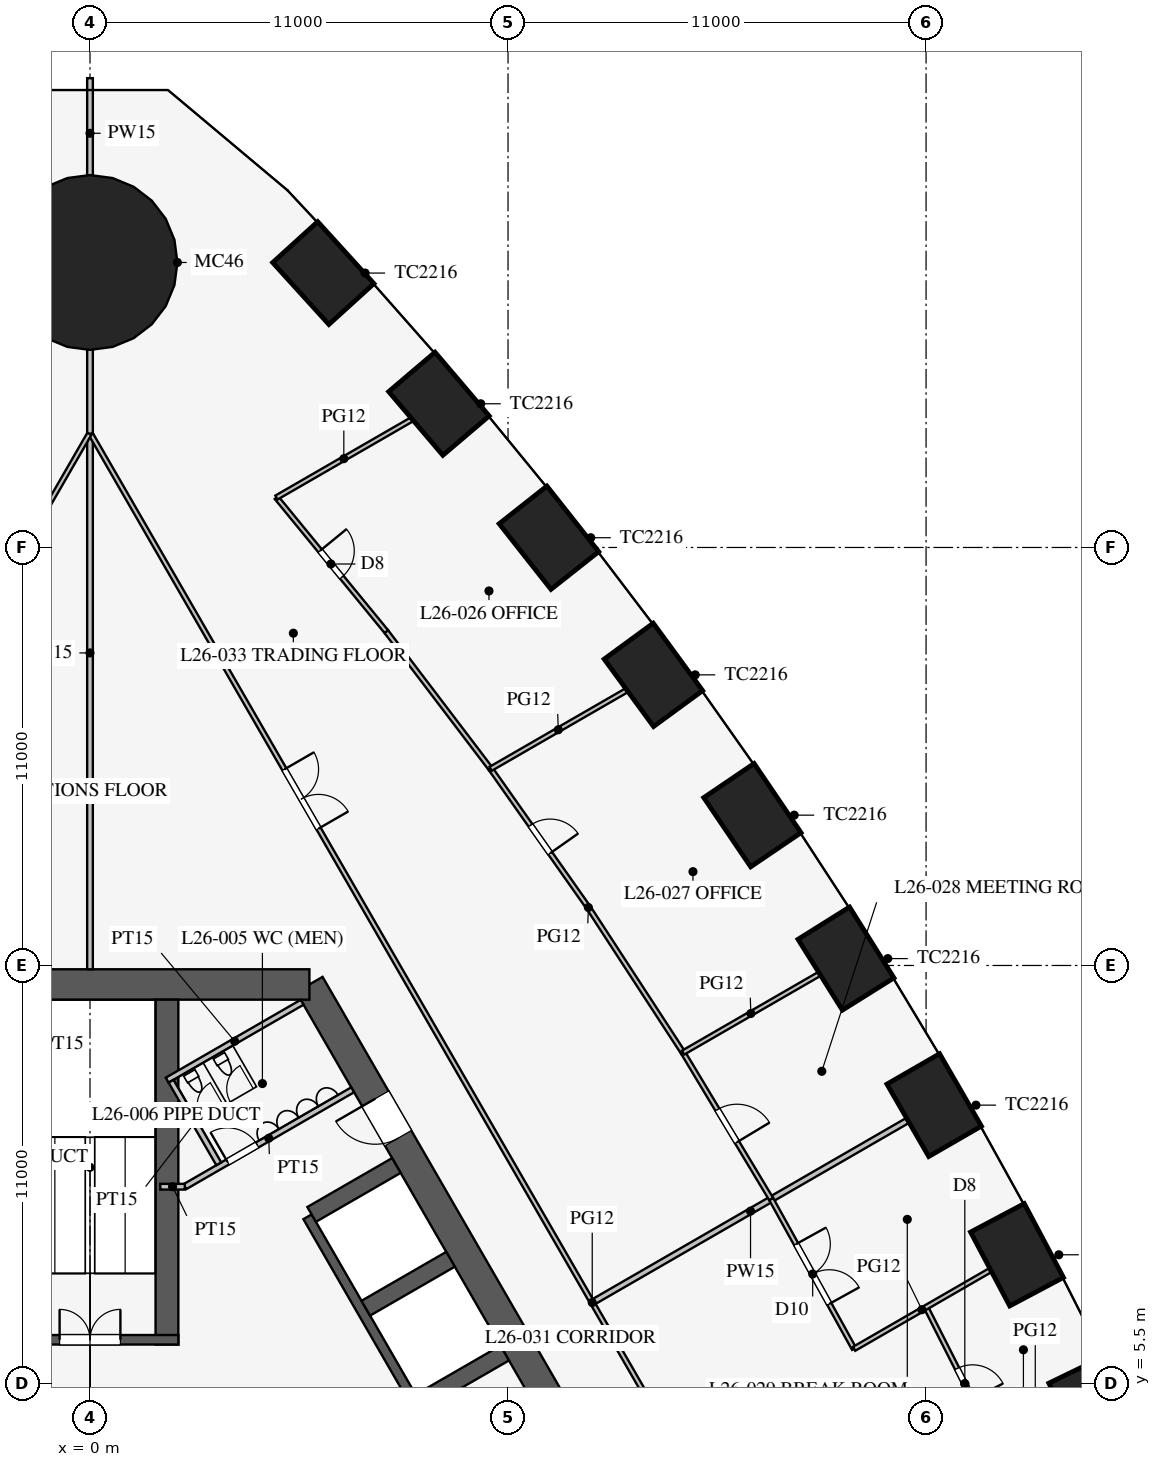
"""IFC4 building model, lengths in metres.
Left out: names, types, materials, properties, quantities, classifications, styles, units other than length and angle.
Written with IfcOpenShell. Run it as: python <this file> out.ifc"""

import sys

from ifc_helpers import new_model, si_unit, direction, frame, frame_2d, origin, origin_2d, place, context, subcontext, project, spatial, rectangle, circle, extrude, element, fill, save


model = new_model("IFC4")
c1 = context("Model", 3, precision=1e-05, world=origin(), true_north=direction((0.0, 1.0)))
c2 = subcontext(c1, "Body", "Model", "MODEL_VIEW")
j1 = project(units=[si_unit("LENGTHUNIT", "METRE"), si_unit("PLANEANGLEUNIT", "RADIAN")], contexts=[c1])
p1 = place(None, origin())
s1 = spatial("IfcSite", under=j1, at=p1, CompositionType="ELEMENT")
p2 = place(p1, origin())
s2 = spatial("IfcBuilding", under=s1, at=p2, CompositionType="ELEMENT")
p3 = place(p2, frame((0.0, 0.0, 115.7)))
s3 = spatial("IfcBuildingStorey", under=s2, at=p3, CompositionType="ELEMENT", Elevation=115.7)
for number, where, z_axis, x_axis in (
    (1, (26.43, 4.867, 0.0), (0.0, 0.0, 1.0), (-0.436, 0.9, 0.0)),
    (2, (24.393, 8.887, 0.0), (0.0, 0.0, 1.0), (-0.468, 0.883, 0.0)),
    (3, (22.213, 12.825, 0.0), (0.0, 0.0, 1.0), (-0.5, 0.866, 0.0)),
    (4, (19.893, 16.681, 0.0), (0.0, 0.0, 1.0), (-0.531, 0.847, 0.0)),
    (5, (17.43, 20.456, 0.0), (0.0, 0.0, 1.0), (-0.561, 0.828, 0.0)),
    (6, (14.825, 24.148, 0.0), (0.0, 0.0, 1.0), (-0.591, 0.807, 0.0)),
    (7, (12.077, 27.757, 0.0), (0.0, 0.0, 1.0), (-0.62, 0.785, 0.0)),
    (8, (9.182, 31.282, 0.0), (0.0, 0.0, 1.0), (-0.648, 0.762, 0.0)),
    (9, (6.139, 34.721, 0.0), (0.0, 0.0, 1.0), (-0.672, 0.74, 0.0)),
):
    element("IfcColumn", number, at=place(p3, frame(where, z_axis=z_axis, x_axis=x_axis)), inside=s3, PredefinedType="COLUMN", context=c2, shape_type="SweptSolid", body=[
        extrude(rectangle(XDim=2.2, YDim=1.6, at=origin_2d()), origin(), (0.0, 0.0, 1.0), 4.2),
    ])
p4 = place(p3, frame((0.0, 35.0, 0.0), z_axis=(0.0, 0.0, 1.0), x_axis=(1.0, 0.0, 0.0)))
e10 = element("IfcColumn", 10, at=p4, inside=s3, PredefinedType="COLUMN", context=c2, shape_type="SweptSolid", body=[
    extrude(circle(Radius=2.3, at=origin_2d()), origin(), (0.0, 0.0, 1.0), 4.2),
])
p5 = place(p3, frame((16.743, -3.0, 0.0), z_axis=(0.0, 0.0, 1.0), x_axis=(-0.500002442456, 0.866023993627, 0.0)))
e11 = element("IfcWall", 11, at=p5, inside=s3, PredefinedType="SHEAR", context=c2, shape_type="SweptSolid", body=[
    extrude(rectangle(XDim=21.939, YDim=0.8, at=frame_2d((10.97, 0.0))), origin(), (0.0, 0.0, 1.0), 4.2),
])
p6 = place(p5, frame((17.27, 0.0, 0.0)))
e12 = element("IfcOpeningElement", 12, at=p6, cuts=e11, PredefinedType="OPENING", context=c2, shape_type="SweptSolid", body=[
    extrude(rectangle(XDim=1.2, YDim=2.1, at=frame_2d((0.6, 1.05))), frame((0.0, 0.41, 0.0), z_axis=(0.0, -1.0, 0.0), x_axis=(1.0, 0.0, 0.0)), (0.0, 0.0, 1.0), 0.82),
])
p7 = place(p5, frame((3.47, 0.0, 0.0)))
e13 = element("IfcOpeningElement", 13, at=p7, cuts=e11, PredefinedType="OPENING", context=c2, shape_type="SweptSolid", body=[
    extrude(rectangle(XDim=1.2, YDim=2.1, at=frame_2d((0.6, 1.05))), frame((0.0, 0.41, 0.0), z_axis=(0.0, -1.0, 0.0), x_axis=(1.0, 0.0, 0.0)), (0.0, 0.0, 1.0), 0.82),
])
p8 = place(p3, frame((5.773, 16.0, 0.0), z_axis=(0.0, 0.0, 1.0), x_axis=(-1.0, 0.0, 0.0)))
e14 = element("IfcWall", 14, at=p8, inside=s3, PredefinedType="SHEAR", context=c2, shape_type="SweptSolid", body=[
    extrude(rectangle(XDim=11.547, YDim=0.8, at=frame_2d((5.773, 0.0))), origin(), (0.0, 0.0, 1.0), 4.2),
])
p9 = place(p3, frame((11.424, 0.014, 0.0), z_axis=(0.0, 0.0, 1.0), x_axis=(-0.500001763848, 0.866024385424, 0.0)))
e15 = element("IfcWall", 15, at=p9, inside=s3, PredefinedType="SHEAR", context=c2, shape_type="SweptSolid", body=[
    extrude(rectangle(XDim=11.4, YDim=0.25, at=frame_2d((5.7, 0.0))), origin(), (0.0, 0.0, 1.0), 4.2),
])
p10 = place(p9, frame((0.975, 0.0, 0.0)))
e16 = element("IfcOpeningElement", 16, at=p10, cuts=e15, PredefinedType="OPENING", context=c2, shape_type="SweptSolid", body=[
    extrude(rectangle(XDim=0.9, YDim=2.1, at=frame_2d((0.45, 1.05))), frame((0.0, 0.135, 0.0), z_axis=(0.0, -1.0, 0.0), x_axis=(1.0, 0.0, 0.0)), (0.0, 0.0, 1.0), 0.27),
])
p11 = place(p9, frame((3.825, 0.0, 0.0)))
e17 = element("IfcOpeningElement", 17, at=p11, cuts=e15, PredefinedType="OPENING", context=c2, shape_type="SweptSolid", body=[
    extrude(rectangle(XDim=0.9, YDim=2.1, at=frame_2d((0.45, 1.05))), frame((0.0, 0.135, 0.0), z_axis=(0.0, -1.0, 0.0), x_axis=(1.0, 0.0, 0.0)), (0.0, 0.0, 1.0), 0.27),
])
for number, where, z_axis, x_axis in (
    (18, (8.682, 5.012, 0.0), (0.0, 0.0, 1.0), (0.866, 0.5, 0.0)),
    (19, (7.257, 7.481, 0.0), (0.0, 0.0, 1.0), (0.866, 0.5, 0.0)),
):
    element("IfcWall", number, at=place(p3, frame(where, z_axis=z_axis, x_axis=x_axis)), inside=s3, PredefinedType="SHEAR", context=c2, shape_type="SweptSolid", body=[
        extrude(rectangle(XDim=2.575, YDim=0.45, at=frame_2d((1.288, 0.0))), origin(), (0.0, 0.0, 1.0), 4.2),
    ])
p12 = place(p3, frame((5.832, 9.949, 0.0), z_axis=(0.0, 0.0, 1.0), x_axis=(0.866029291668, 0.499993265928, 0.0)))
e20 = element("IfcWall", 20, at=p12, inside=s3, PredefinedType="SHEAR", context=c2, shape_type="SweptSolid", body=[
    extrude(rectangle(XDim=2.575, YDim=0.45, at=frame_2d((1.288, 0.0))), origin(), (0.0, 0.0, 1.0), 4.2),
])
p13 = place(p3, frame((2.025, 6.525, 0.0), z_axis=(0.0, 0.0, 1.0), x_axis=(0.0, 1.0, 0.0)))
e21 = element("IfcWall", 21, at=p13, inside=s3, PredefinedType="SHEAR", context=c2, shape_type="SweptSolid", body=[
    extrude(rectangle(XDim=9.075, YDim=0.6, at=frame_2d((4.538, 0.0))), origin(), (0.0, 0.0, 1.0), 4.2),
])
p14 = place(p3, frame((2.325, 6.65, 0.0), z_axis=(0.0, 0.0, 1.0), x_axis=(-1.0, 0.0, 0.0)))
e22 = element("IfcWall", 22, at=p14, inside=s3, PredefinedType="SHEAR", context=c2, shape_type="SweptSolid", body=[
    extrude(rectangle(XDim=4.65, YDim=0.25, at=frame_2d((2.325, 0.0))), origin(), (0.0, 0.0, 1.0), 4.2),
])
p15 = place(p14, frame((1.525, 0.0, 0.0)))
e23 = element("IfcOpeningElement", 23, at=p15, cuts=e22, PredefinedType="OPENING", context=c2, shape_type="SweptSolid", body=[
    extrude(rectangle(XDim=1.6, YDim=2.1, at=frame_2d((0.8, 1.05))), frame((0.0, 0.135, 0.0), z_axis=(0.0, -1.0, 0.0), x_axis=(1.0, 0.0, 0.0)), (0.0, 0.0, 1.0), 0.27),
])
p16 = place(p3, frame((2.495, 10.678, 0.0), z_axis=(0.0, 0.0, 1.0), x_axis=(0.86602216432, 0.500005610874, 0.0)))
e24 = element("IfcWall", 24, at=p16, inside=s3, PredefinedType="PARTITIONING", context=c2, shape_type="SweptSolid", body=[
    extrude(rectangle(XDim=5.1, YDim=0.15, at=frame_2d((2.55, 0.0))), origin(), (0.0, 0.0, 1.0), 4.0),
])
p17 = place(p16, frame((1.3, 0.0, 0.0)))
e25 = element("IfcOpeningElement", 25, at=p17, cuts=e24, PredefinedType="OPENING", context=c2, shape_type="SweptSolid", body=[
    extrude(rectangle(XDim=0.9, YDim=2.1, at=frame_2d((0.45, 1.05))), frame((0.0, 0.085, 0.0), z_axis=(0.0, -1.0, 0.0), x_axis=(1.0, 0.0, 0.0)), (0.0, 0.0, 1.0), 0.17),
])
p18 = place(p3, frame((2.495, 10.678, 0.0), z_axis=(0.0, 0.0, 1.0), x_axis=(-1.0, 0.0, 0.0)))
e26 = element("IfcWall", 26, at=p18, inside=s3, PredefinedType="PARTITIONING", context=c2, shape_type="SweptSolid", body=[
    extrude(rectangle(XDim=0.645, YDim=0.15, at=frame_2d((0.323, 0.0))), origin(), (0.0, 0.0, 1.0), 4.0),
])
p19 = place(p3, frame((2.031, 13.482, 0.0), z_axis=(0.0, 0.0, 1.0), x_axis=(0.866050731258, 0.499956128963, 0.0)))
e27 = element("IfcWall", 27, at=p19, inside=s3, PredefinedType="PARTITIONING", context=c2, shape_type="SweptSolid", body=[
    extrude(rectangle(XDim=4.1, YDim=0.15, at=frame_2d((2.05, 0.0))), origin(), (0.0, 0.0, 1.0), 4.0),
])
p20 = place(p3, frame((3.389, 11.281, 0.0), z_axis=(0.0, 0.0, 1.0), x_axis=(-0.499989096993, 0.866031698547, 0.0)))
e28 = element("IfcWall", 28, at=p20, inside=s3, PredefinedType="PARTITIONING", context=c2, shape_type="SweptSolid", body=[
    extrude(rectangle(XDim=2.51, YDim=0.15, at=frame_2d((1.255, 0.0))), origin(), (0.0, 0.0, 1.0), 4.0),
])
p21 = place(p3, frame((0.0, 16.4, 0.0), z_axis=(0.0, 0.0, 1.0), x_axis=(0.0, 1.0, 0.0)))
e29 = element("IfcWall", 29, at=p21, inside=s3, PredefinedType="PARTITIONING", context=c2, shape_type="SweptSolid", body=[
    extrude(rectangle(XDim=16.65, YDim=0.15, at=frame_2d((8.325, 0.0))), origin(), (0.0, 0.0, 1.0), 2.3),
])
p22 = place(p3, frame((0.0, 36.95, 0.0), z_axis=(0.0, 0.0, 1.0), x_axis=(0.0, 1.0, 0.0)))
e30 = element("IfcWall", 30, at=p22, inside=s3, PredefinedType="PARTITIONING", context=c2, shape_type="SweptSolid", body=[
    extrude(rectangle(XDim=2.899, YDim=0.15, at=frame_2d((1.45, 0.0))), origin(), (0.0, 0.0, 1.0), 2.3),
])
p23 = place(p3, frame((13.268, 7.66, 0.0), z_axis=(0.0, 0.0, 1.0), x_axis=(0.866013963754, 0.500019814191, 0.0)))
e31 = element("IfcWall", 31, at=p23, inside=s3, PredefinedType="PARTITIONING", context=c2, shape_type="SweptSolid", body=[
    extrude(rectangle(XDim=9.5, YDim=0.15, at=frame_2d((4.75, 0.0))), origin(), (0.0, 0.0, 1.0), 3.2),
])
p24 = place(p3, frame((26.415, -15.231, 0.0), z_axis=(0.0, 0.0, 1.0), x_axis=(-0.50000091641, 0.866024874695, 0.0)))
e32 = element("IfcWall", 32, at=p24, inside=s3, PredefinedType="PARTITIONING", context=c2, shape_type="SweptSolid", body=[
    extrude(rectangle(XDim=52.796, YDim=0.12, at=frame_2d((26.398, 0.0))), origin(), (0.0, 0.0, 1.0), 2.9),
])
p25 = place(p24, frame((10.2, 0.0, 0.15)))
e33 = element("IfcOpeningElement", 33, at=p25, cuts=e32, PredefinedType="OPENING", context=c2, shape_type="SweptSolid", body=[
    extrude(rectangle(XDim=1.8, YDim=2.1, at=frame_2d((0.9, 1.05))), frame((0.0, 0.07, 0.0), z_axis=(0.0, -1.0, 0.0), x_axis=(1.0, 0.0, 0.0)), (0.0, 0.0, 1.0), 0.14),
])
p26 = place(p24, frame((40.8, 0.0, 0.15)))
e34 = element("IfcOpeningElement", 34, at=p26, cuts=e32, PredefinedType="OPENING", context=c2, shape_type="SweptSolid", body=[
    extrude(rectangle(XDim=1.8, YDim=2.1, at=frame_2d((0.9, 1.05))), frame((0.0, 0.07, 0.0), z_axis=(0.0, -1.0, 0.0), x_axis=(1.0, 0.0, 0.0)), (0.0, 0.0, 1.0), 0.14),
])
p27 = place(p3, frame((17.927, 10.35, 0.0), z_axis=(0.0, 0.0, 1.0), x_axis=(-0.515548366618, 0.856860479703, 0.0)))
e35 = element("IfcWall", 35, at=p27, inside=s3, PredefinedType="PARTITIONING", context=c2, shape_type="SweptSolid", body=[
    extrude(rectangle(XDim=4.501, YDim=0.12, at=frame_2d((2.25, 0.0))), origin(), (0.0, 0.0, 1.0), 2.9),
])
p28 = place(p27, frame((1.75, 0.0, 0.15)))
e36 = element("IfcOpeningElement", 36, at=p28, cuts=e35, PredefinedType="OPENING", context=c2, shape_type="SweptSolid", body=[
    extrude(rectangle(XDim=1.0, YDim=2.1, at=frame_2d((0.5, 1.05))), frame((0.0, 0.07, 0.0), z_axis=(0.0, -1.0, 0.0), x_axis=(1.0, 0.0, 0.0)), (0.0, 0.0, 1.0), 0.14),
])
p29 = place(p3, frame((10.543, 21.675, 0.0), z_axis=(0.0, 0.0, 1.0), x_axis=(-0.605274299339, 0.796016973789, 0.0)))
e37 = element("IfcWall", 37, at=p29, inside=s3, PredefinedType="PARTITIONING", context=c2, shape_type="SweptSolid", body=[
    extrude(rectangle(XDim=4.536, YDim=0.12, at=frame_2d((2.268, 0.0))), origin(), (0.0, 0.0, 1.0), 2.9),
])
p30 = place(p3, frame((7.797, 25.286, 0.0), z_axis=(0.0, 0.0, 1.0), x_axis=(-0.633843962561, 0.773460943503, 0.0)))
e38 = element("IfcWall", 38, at=p30, inside=s3, PredefinedType="PARTITIONING", context=c2, shape_type="SweptSolid", body=[
    extrude(rectangle(XDim=4.561, YDim=0.12, at=frame_2d((2.28, 0.0))), origin(), (0.0, 0.0, 1.0), 2.9),
])
p31 = place(p30, frame((1.85, 0.0, 0.15)))
e39 = element("IfcOpeningElement", 39, at=p31, cuts=e38, PredefinedType="OPENING", context=c2, shape_type="SweptSolid", body=[
    extrude(rectangle(XDim=0.9, YDim=2.1, at=frame_2d((0.45, 1.05))), frame((0.0, 0.07, 0.0), z_axis=(0.0, -1.0, 0.0), x_axis=(1.0, 0.0, 0.0)), (0.0, 0.0, 1.0), 0.14),
])
p32 = place(p3, frame((15.606, 14.206, 0.0), z_axis=(0.0, 0.0, 1.0), x_axis=(-0.546069464151, 0.837739900161, 0.0)))
e40 = element("IfcWall", 40, at=p32, inside=s3, PredefinedType="PARTITIONING", context=c2, shape_type="SweptSolid", body=[
    extrude(rectangle(XDim=4.507, YDim=0.12, at=frame_2d((2.253, 0.0))), origin(), (0.0, 0.0, 1.0), 2.9),
])
p33 = place(p3, frame((13.145, 17.982, 0.0), z_axis=(0.0, 0.0, 1.0), x_axis=(-0.575987178736, 0.817458726745, 0.0)))
e41 = element("IfcWall", 41, at=p33, inside=s3, PredefinedType="PARTITIONING", context=c2, shape_type="SweptSolid", body=[
    extrude(rectangle(XDim=4.518, YDim=0.12, at=frame_2d((2.259, 0.0))), origin(), (0.0, 0.0, 1.0), 2.9),
])
p34 = place(p33, frame((1.8, 0.0, 0.15)))
e42 = element("IfcOpeningElement", 42, at=p34, cuts=e41, PredefinedType="OPENING", context=c2, shape_type="SweptSolid", body=[
    extrude(rectangle(XDim=0.9, YDim=2.1, at=frame_2d((0.45, 1.05))), frame((0.0, 0.07, 0.0), z_axis=(0.0, -1.0, 0.0), x_axis=(1.0, 0.0, 0.0)), (0.0, 0.0, 1.0), 0.14),
])
p35 = place(p3, frame((20.106, 6.412, 0.0), z_axis=(0.0, 0.0, 1.0), x_axis=(-0.484292898211, 0.874905931368, 0.0)))
e43 = element("IfcWall", 43, at=p35, inside=s3, PredefinedType="PARTITIONING", context=c2, shape_type="SweptSolid", body=[
    extrude(rectangle(XDim=4.501, YDim=0.12, at=frame_2d((2.25, 0.0))), origin(), (0.0, 0.0, 1.0), 2.9),
])
p36 = place(p35, frame((1.35, 0.0, 0.15)))
e44 = element("IfcOpeningElement", 44, at=p36, cuts=e43, PredefinedType="OPENING", context=c2, shape_type="SweptSolid", body=[
    extrude(rectangle(XDim=1.8, YDim=2.1, at=frame_2d((0.9, 1.05))), frame((0.0, 0.07, 0.0), z_axis=(0.0, -1.0, 0.0), x_axis=(1.0, 0.0, 0.0)), (0.0, 0.0, 1.0), 0.14),
])
p37 = place(p3, frame((24.037, 3.486, 0.0), z_axis=(0.0, 0.0, 1.0), x_axis=(-0.452428593635, 0.891800632239, 0.0)))
e45 = element("IfcWall", 45, at=p37, inside=s3, PredefinedType="PARTITIONING", context=c2, shape_type="SweptSolid", body=[
    extrude(rectangle(XDim=4.506, YDim=0.12, at=frame_2d((2.253, 0.0))), origin(), (0.0, 0.0, 1.0), 2.9),
])
p38 = place(p37, frame((1.8, 0.0, 0.15)))
e46 = element("IfcOpeningElement", 46, at=p38, cuts=e45, PredefinedType="OPENING", context=c2, shape_type="SweptSolid", body=[
    extrude(rectangle(XDim=0.9, YDim=2.1, at=frame_2d((0.45, 1.05))), frame((0.0, 0.07, 0.0), z_axis=(0.0, -1.0, 0.0), x_axis=(1.0, 0.0, 0.0)), (0.0, 0.0, 1.0), 0.14),
])
p39 = place(p3, frame((10.543, 21.675, 0.0), z_axis=(0.0, 0.0, 1.0), x_axis=(0.866019409031, 0.500010383074, 0.0)))
e47 = element("IfcWall", 47, at=p39, inside=s3, PredefinedType="PARTITIONING", context=c2, shape_type="SweptSolid", body=[
    extrude(rectangle(XDim=4.11, YDim=0.12, at=frame_2d((2.055, 0.0))), origin(), (0.0, 0.0, 1.0), 2.9),
])
p40 = place(p3, frame((4.906, 28.813, 0.0), z_axis=(0.0, 0.0, 1.0), x_axis=(0.86601374377, 0.500020195194, 0.0)))
e48 = element("IfcWall", 48, at=p40, inside=s3, PredefinedType="PARTITIONING", context=c2, shape_type="SweptSolid", body=[
    extrude(rectangle(XDim=4.093, YDim=0.12, at=frame_2d((2.046, 0.0))), origin(), (0.0, 0.0, 1.0), 2.9),
])
for number, where, z_axis, x_axis in (
    (49, (15.606, 14.206, 0.0), (0.0, 0.0, 1.0), (0.866, 0.5, 0.0)),
    (50, (20.106, 6.412, 0.0), (0.0, 0.0, 1.0), (0.866, 0.5, 0.0)),
):
    element("IfcWall", number, at=place(p3, frame(where, z_axis=z_axis, x_axis=x_axis)), inside=s3, PredefinedType="PARTITIONING", context=c2, shape_type="SweptSolid", body=[
        extrude(rectangle(XDim=4.119, YDim=0.12, at=frame_2d((2.06, 0.0))), origin(), (0.0, 0.0, 1.0), 2.9),
    ])
p41 = place(p3, frame((-0.016, 30.491, 0.0), z_axis=(0.0, 0.0, 1.0), x_axis=(-0.50000091641, -0.866024874695, 0.0)))
e51 = element("IfcWall", 51, at=p41, inside=s3, PredefinedType="PARTITIONING", context=c2, shape_type="SweptSolid", body=[
    extrude(rectangle(XDim=52.796, YDim=0.12, at=frame_2d((26.398, 0.0))), origin(), (0.0, 0.0, 1.0), 2.9),
])
p42 = place(p41, frame((10.2, 0.0, 0.15)))
e52 = element("IfcOpeningElement", 52, at=p42, cuts=e51, PredefinedType="OPENING", context=c2, shape_type="SweptSolid", body=[
    extrude(rectangle(XDim=1.8, YDim=2.1, at=frame_2d((0.9, 1.05))), frame((0.0, 0.07, 0.0), z_axis=(0.0, -1.0, 0.0), x_axis=(1.0, 0.0, 0.0)), (0.0, 0.0, 1.0), 0.14),
])
p43 = place(p41, frame((40.8, 0.0, 0.15)))
e53 = element("IfcOpeningElement", 53, at=p43, cuts=e51, PredefinedType="OPENING", context=c2, shape_type="SweptSolid", body=[
    extrude(rectangle(XDim=1.8, YDim=2.1, at=frame_2d((0.9, 1.05))), frame((0.0, 0.07, 0.0), z_axis=(0.0, -1.0, 0.0), x_axis=(1.0, 0.0, 0.0)), (0.0, 0.0, 1.0), 0.14),
])
p44 = place(p17, origin())
e54 = element("IfcDoor", 54, at=p44, inside=s3, OperationType="SINGLE_SWING_LEFT", PredefinedType="DOOR", context=c2, shape_type="SweptSolid", body=[
    extrude(rectangle(XDim=0.9, YDim=2.1, at=frame_2d((0.45, 1.05))), frame((0.0, 0.025, 0.0), z_axis=(0.0, -1.0, 0.0), x_axis=(1.0, 0.0, 0.0)), (0.0, 0.0, 1.0), 0.05),
])
fill(e25, e54)
p45 = place(p15, frame((1.6, 0.0, 0.0), z_axis=(0.0, 0.0, 1.0), x_axis=(-1.0, 0.0, 0.0)))
e55 = element("IfcDoor", 55, at=p45, inside=s3, OperationType="DOUBLE_DOOR_SINGLE_SWING", PredefinedType="DOOR", context=c2, shape_type="SweptSolid", body=[
    extrude(rectangle(XDim=1.6, YDim=2.1, at=frame_2d((0.8, 1.05))), frame((0.0, 0.025, 0.0), z_axis=(0.0, -1.0, 0.0), x_axis=(1.0, 0.0, 0.0)), (0.0, 0.0, 1.0), 0.05),
])
fill(e23, e55)
p46 = place(p6, origin())
e56 = element("IfcDoor", 56, at=p46, inside=s3, OperationType="SINGLE_SWING_RIGHT", PredefinedType="DOOR", context=c2, shape_type="SweptSolid", body=[
    extrude(rectangle(XDim=1.2, YDim=2.1, at=frame_2d((0.6, 1.05))), frame((0.0, 0.025, 0.0), z_axis=(0.0, -1.0, 0.0), x_axis=(1.0, 0.0, 0.0)), (0.0, 0.0, 1.0), 0.05),
])
fill(e12, e56)
p47 = place(p31, frame((0.9, 0.0, 0.0), z_axis=(0.0, 0.0, 1.0), x_axis=(-1.0, 0.0, 0.0)))
e57 = element("IfcDoor", 57, at=p47, inside=s3, OperationType="SINGLE_SWING_LEFT", PredefinedType="DOOR", context=c2, shape_type="SweptSolid", body=[
    extrude(rectangle(XDim=0.9, YDim=2.1, at=frame_2d((0.45, 1.05))), frame((0.0, 0.025, 0.0), z_axis=(0.0, -1.0, 0.0), x_axis=(1.0, 0.0, 0.0)), (0.0, 0.0, 1.0), 0.05),
])
fill(e39, e57)
p48 = place(p34, frame((0.9, 0.0, 0.0), z_axis=(0.0, 0.0, 1.0), x_axis=(-1.0, 0.0, 0.0)))
e58 = element("IfcDoor", 58, at=p48, inside=s3, OperationType="SINGLE_SWING_RIGHT", PredefinedType="DOOR", context=c2, shape_type="SweptSolid", body=[
    extrude(rectangle(XDim=0.9, YDim=2.1, at=frame_2d((0.45, 1.05))), frame((0.0, 0.025, 0.0), z_axis=(0.0, -1.0, 0.0), x_axis=(1.0, 0.0, 0.0)), (0.0, 0.0, 1.0), 0.05),
])
fill(e42, e58)
p49 = place(p28, frame((1.0, 0.0, 0.0), z_axis=(0.0, 0.0, 1.0), x_axis=(-1.0, 0.0, 0.0)))
e59 = element("IfcDoor", 59, at=p49, inside=s3, OperationType="SINGLE_SWING_RIGHT", PredefinedType="DOOR", context=c2, shape_type="SweptSolid", body=[
    extrude(rectangle(XDim=1.0, YDim=2.1, at=frame_2d((0.5, 1.05))), frame((0.0, 0.025, 0.0), z_axis=(0.0, -1.0, 0.0), x_axis=(1.0, 0.0, 0.0)), (0.0, 0.0, 1.0), 0.05),
])
fill(e36, e59)
p50 = place(p36, frame((1.8, 0.0, 0.0), z_axis=(0.0, 0.0, 1.0), x_axis=(-1.0, 0.0, 0.0)))
e60 = element("IfcDoor", 60, at=p50, inside=s3, OperationType="DOUBLE_DOOR_SINGLE_SWING", PredefinedType="DOOR", context=c2, shape_type="SweptSolid", body=[
    extrude(rectangle(XDim=1.8, YDim=2.1, at=frame_2d((0.9, 1.05))), frame((0.0, 0.025, 0.0), z_axis=(0.0, -1.0, 0.0), x_axis=(1.0, 0.0, 0.0)), (0.0, 0.0, 1.0), 0.05),
])
fill(e44, e60)
p51 = place(p38, frame((0.9, 0.0, 0.0), z_axis=(0.0, 0.0, 1.0), x_axis=(-1.0, 0.0, 0.0)))
e61 = element("IfcDoor", 61, at=p51, inside=s3, OperationType="SINGLE_SWING_RIGHT", PredefinedType="DOOR", context=c2, shape_type="SweptSolid", body=[
    extrude(rectangle(XDim=0.9, YDim=2.1, at=frame_2d((0.45, 1.05))), frame((0.0, 0.025, 0.0), z_axis=(0.0, -1.0, 0.0), x_axis=(1.0, 0.0, 0.0)), (0.0, 0.0, 1.0), 0.05),
])
fill(e46, e61)
p52 = place(p26, frame((1.8, 0.0, 0.0), z_axis=(0.0, 0.0, 1.0), x_axis=(-1.0, 0.0, 0.0)))
e62 = element("IfcDoor", 62, at=p52, inside=s3, OperationType="DOUBLE_DOOR_SINGLE_SWING", PredefinedType="DOOR", context=c2, shape_type="SweptSolid", body=[
    extrude(rectangle(XDim=1.8, YDim=2.1, at=frame_2d((0.9, 1.05))), frame((0.0, 0.025, 0.0), z_axis=(0.0, -1.0, 0.0), x_axis=(1.0, 0.0, 0.0)), (0.0, 0.0, 1.0), 0.05),
])
fill(e34, e62)
save(model, sys.argv[1])
